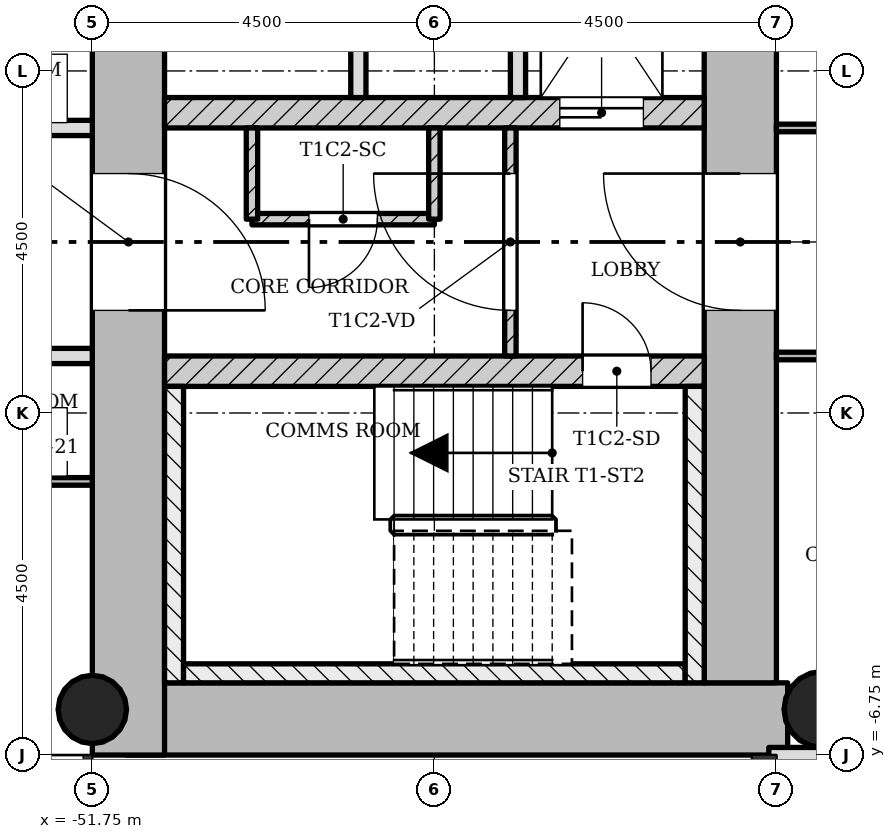
"""IFC4 building model, lengths in metres.
Left out: names, types, materials, properties, quantities, classifications, styles, units other than length and angle.
Written with IfcOpenShell. Run it as: python <this file> out.ifc"""

import sys

from ifc_helpers import new_model, si_unit, direction, frame, frame_2d, origin, origin_2d, place, context, subcontext, project, spatial, rectangle, hollow_circle, extrude, element, fill, save


model = new_model("IFC4")
c1 = context("Model", 3, precision=1e-05, world=origin(), true_north=direction((0.0, 1.0)))
c2 = subcontext(c1, "Body", "Model", "MODEL_VIEW")
j1 = project(units=[si_unit("LENGTHUNIT", "METRE"), si_unit("PLANEANGLEUNIT", "RADIAN")], contexts=[c1])
p1 = place(None, origin())
s1 = spatial("IfcSite", under=j1, at=p1, CompositionType="ELEMENT")
p2 = place(p1, origin())
s2 = spatial("IfcBuilding", under=s1, at=p2, CompositionType="ELEMENT")
p3 = place(p2, frame((0.0, 0.0, 83.4)))
s3 = spatial("IfcBuildingStorey", under=s2, at=p3, CompositionType="ELEMENT", Elevation=83.4)
p4 = place(p3, frame((-51.298, -6.275, 0.0), z_axis=(0.0, 0.0, 1.0), x_axis=(1.0, 0.0, 0.0)))
e1 = element("IfcWall", 1, at=p4, inside=s3, PredefinedType="SHEAR", context=c2, shape_type="SweptSolid", body=[
    extrude(rectangle(XDim=8.696, YDim=0.95, at=frame_2d((4.348, 0.0))), origin(), (0.0, 0.0, 1.0), 3.4),
])
p5 = place(p3, frame((-43.225, -5.8, 0.0), z_axis=(0.0, 0.0, 1.0), x_axis=(0.0, 1.0, 0.0)))
e2 = element("IfcWall", 2, at=p5, inside=s3, PredefinedType="SHEAR", context=c2, shape_type="SweptSolid", body=[
    extrude(rectangle(XDim=12.55, YDim=0.95, at=frame_2d((6.275, 0.0))), origin(), (0.0, 0.0, 1.0), 3.4),
])
p6 = place(p5, frame((4.9, 0.0, 0.0)))
e3 = element("IfcOpeningElement", 3, at=p6, cuts=e2, PredefinedType="OPENING", context=c2, shape_type="SweptSolid", body=[
    extrude(rectangle(XDim=1.8, YDim=2.1, at=frame_2d((0.9, 1.05))), frame((0.0, 0.485, 0.0), z_axis=(0.0, -1.0, 0.0), x_axis=(1.0, 0.0, 0.0)), (0.0, 0.0, 1.0), 0.97),
])
p7 = place(p3, frame((-51.275, 5.8, 0.0), z_axis=(0.0, 0.0, 1.0), x_axis=(0.0, -1.0, 0.0)))
e4 = element("IfcWall", 4, at=p7, inside=s3, PredefinedType="SHEAR", context=c2, shape_type="SweptSolid", body=[
    extrude(rectangle(XDim=12.55, YDim=0.95, at=frame_2d((6.275, 0.0))), origin(), (0.0, 0.0, 1.0), 3.4),
])
p8 = place(p7, frame((4.9, 0.0, 0.0)))
e5 = element("IfcOpeningElement", 5, at=p8, cuts=e4, PredefinedType="OPENING", context=c2, shape_type="SweptSolid", body=[
    extrude(rectangle(XDim=1.8, YDim=2.1, at=frame_2d((0.9, 1.05))), frame((0.0, 0.485, 0.0), z_axis=(0.0, -1.0, 0.0), x_axis=(1.0, 0.0, 0.0)), (0.0, 0.0, 1.0), 0.97),
])
p9 = place(p3, frame((-50.8, -1.7, 0.0), z_axis=(0.0, 0.0, 1.0), x_axis=(1.0, 0.0, 0.0)))
e6 = element("IfcWall", 6, at=p9, inside=s3, PredefinedType="SHEAR", context=c2, shape_type="SweptSolid", body=[
    extrude(rectangle(XDim=7.1, YDim=0.4, at=frame_2d((3.55, 0.0))), origin(), (0.0, 0.0, 1.0), 3.4),
])
p10 = place(p9, frame((5.5, 0.0, 0.0)))
e7 = element("IfcOpeningElement", 7, at=p10, cuts=e6, PredefinedType="OPENING", context=c2, shape_type="SweptSolid", body=[
    extrude(rectangle(XDim=0.9, YDim=2.1, at=frame_2d((0.45, 1.05))), frame((0.0, 0.21, 0.0), z_axis=(0.0, -1.0, 0.0), x_axis=(1.0, 0.0, 0.0)), (0.0, 0.0, 1.0), 0.42),
])
p11 = place(p3, frame((-50.8, 1.7, 0.0), z_axis=(0.0, 0.0, 1.0), x_axis=(1.0, 0.0, 0.0)))
e8 = element("IfcWall", 8, at=p11, inside=s3, PredefinedType="SHEAR", context=c2, shape_type="SweptSolid", body=[
    extrude(rectangle(XDim=7.1, YDim=0.4, at=frame_2d((3.55, 0.0))), origin(), (0.0, 0.0, 1.0), 3.4),
])
p12 = place(p11, frame((5.2, 0.0, 0.0)))
e9 = element("IfcOpeningElement", 9, at=p12, cuts=e8, PredefinedType="OPENING", context=c2, shape_type="SweptSolid", body=[
    extrude(rectangle(XDim=1.1, YDim=2.1, at=frame_2d((0.55, 1.05))), frame((0.0, 0.21, 0.0), z_axis=(0.0, -1.0, 0.0), x_axis=(1.0, 0.0, 0.0)), (0.0, 0.0, 1.0), 0.42),
])
p13 = place(p3, frame((-51.75, -6.15, 0.0), z_axis=(0.0, 0.0, 1.0), x_axis=(1.0, 0.0, 0.0)))
e10 = element("IfcColumn", 10, at=p13, inside=s3, PredefinedType="COLUMN", context=c2, shape_type="SweptSolid", body=[
    extrude(hollow_circle(Radius=0.45, WallThickness=0.032, at=origin_2d()), origin(), (0.0, 0.0, 1.0), 3.4),
])
p14 = place(p3, frame((-42.15, -6.15, 0.0), z_axis=(0.0, 0.0, 1.0), x_axis=(1.0, 0.0, 0.0)))
e11 = element("IfcColumn", 11, at=p14, inside=s3, PredefinedType="COLUMN", context=c2, shape_type="SweptSolid", body=[
    extrude(hollow_circle(Radius=0.5, WallThickness=0.036, at=origin_2d()), origin(), (0.0, 0.0, 1.0), 3.4),
])
p15 = place(p3, frame((-46.25, 1.5, 0.0), z_axis=(0.0, 0.0, 1.0), x_axis=(0.0, -1.0, 0.0)))
e12 = element("IfcWall", 12, at=p15, inside=s3, PredefinedType="PARTITIONING", context=c2, shape_type="SweptSolid", body=[
    extrude(rectangle(XDim=3.0, YDim=0.15, at=frame_2d((1.5, 0.0))), origin(), (0.0, 0.0, 1.0), 3.0),
])
p16 = place(p15, frame((0.6, 0.0, 0.0)))
e13 = element("IfcOpeningElement", 13, at=p16, cuts=e12, PredefinedType="OPENING", context=c2, shape_type="SweptSolid", body=[
    extrude(rectangle(XDim=1.8, YDim=2.1, at=frame_2d((0.9, 1.05))), frame((0.0, 0.085, 0.0), z_axis=(0.0, -1.0, 0.0), x_axis=(1.0, 0.0, 0.0)), (0.0, 0.0, 1.0), 0.17),
])
for number, where, z_axis, x_axis in (
    (14, (-46.15, 5.8, 0.0), (0.0, 0.0, 1.0), (0.0, -1.0, 0.0)),
    (15, (-48.25, 5.8, 0.0), (0.0, 0.0, 1.0), (0.0, -1.0, 0.0)),
):
    element("IfcWall", number, at=place(p3, frame(where, z_axis=z_axis, x_axis=x_axis)), inside=s3, PredefinedType="SOLIDWALL", context=c2, shape_type="SweptSolid", body=[
        extrude(rectangle(XDim=3.9, YDim=0.2, at=frame_2d((1.95, 0.0))), origin(), (0.0, 0.0, 1.0), 3.0),
    ])
p17 = place(p3, frame((-47.25, 0.3, 0.0), z_axis=(0.0, 0.0, 1.0), x_axis=(-1.0, 0.0, 0.0)))
e16 = element("IfcWall", 16, at=p17, inside=s3, PredefinedType="PARTITIONING", context=c2, shape_type="SweptSolid", body=[
    extrude(rectangle(XDim=2.4, YDim=0.15, at=frame_2d((1.2, 0.0))), origin(), (0.0, 0.0, 1.0), 3.0),
])
p18 = place(p17, frame((0.75, 0.0, 0.0)))
e17 = element("IfcOpeningElement", 17, at=p18, cuts=e16, PredefinedType="OPENING", context=c2, shape_type="SweptSolid", body=[
    extrude(rectangle(XDim=0.9, YDim=2.1, at=frame_2d((0.45, 1.05))), frame((0.0, 0.085, 0.0), z_axis=(0.0, -1.0, 0.0), x_axis=(1.0, 0.0, 0.0)), (0.0, 0.0, 1.0), 0.17),
])
for number, where, z_axis, x_axis in (
    (18, (-47.25, 0.3, 0.0), (0.0, 0.0, 1.0), (0.0, 1.0, 0.0)),
    (19, (-49.65, 0.3, 0.0), (0.0, 0.0, 1.0), (0.0, 1.0, 0.0)),
):
    element("IfcWall", number, at=place(p3, frame(where, z_axis=z_axis, x_axis=x_axis)), inside=s3, PredefinedType="PARTITIONING", context=c2, shape_type="SweptSolid", body=[
        extrude(rectangle(XDim=1.2, YDim=0.15, at=frame_2d((0.6, 0.0))), origin(), (0.0, 0.0, 1.0), 3.0),
    ])
p19 = place(p3, frame((-42.85, -6.75, 0.0), z_axis=(0.0, 0.0, 1.0), x_axis=(1.0, 0.0, 0.0)))
e20 = element("IfcWall", 20, at=p19, inside=s3, PredefinedType="SOLIDWALL", context=c2, shape_type="SweptSolid", body=[
    extrude(rectangle(XDim=5.95, YDim=0.2, at=frame_2d((2.975, 0.0))), origin(), (0.0, 0.0, 1.0), 3.0),
])
p20 = place(p3, frame((-56.25, -3.15, 0.0), z_axis=(0.0, 0.0, 1.0), x_axis=(1.0, 0.0, 0.0)))
e21 = element("IfcWall", 21, at=p20, inside=s3, PredefinedType="PARTITIONING", context=c2, shape_type="SweptSolid", body=[
    extrude(rectangle(XDim=4.5, YDim=0.1, at=frame_2d((2.25, 0.0))), origin(), (0.0, 0.0, 1.0), 3.0),
])
p21 = place(p20, frame((0.6, 0.0, 0.0)))
e22 = element("IfcOpeningElement", 22, at=p21, cuts=e21, PredefinedType="OPENING", context=c2, shape_type="SweptSolid", body=[
    extrude(rectangle(XDim=0.9, YDim=2.1, at=frame_2d((0.45, 1.05))), frame((0.0, 0.06, 0.0), z_axis=(0.0, -1.0, 0.0), x_axis=(1.0, 0.0, 0.0)), (0.0, 0.0, 1.0), 0.12),
])
p22 = place(p3, frame((-42.75, -1.5, 0.0), z_axis=(0.0, 0.0, 1.0), x_axis=(1.0, 0.0, 0.0)))
e23 = element("IfcWall", 23, at=p22, inside=s3, PredefinedType="PARTITIONING", context=c2, shape_type="SweptSolid", body=[
    extrude(rectangle(XDim=5.85, YDim=0.1, at=frame_2d((2.925, 0.0))), origin(), (0.0, 0.0, 1.0), 3.0),
])
p23 = place(p22, frame((0.975, 0.0, 0.0)))
e24 = element("IfcOpeningElement", 24, at=p23, cuts=e23, PredefinedType="OPENING", context=c2, shape_type="SweptSolid", body=[
    extrude(rectangle(XDim=0.9, YDim=2.1, at=frame_2d((0.45, 1.05))), frame((0.0, 0.06, 0.0), z_axis=(0.0, -1.0, 0.0), x_axis=(1.0, 0.0, 0.0)), (0.0, 0.0, 1.0), 0.12),
])
p24 = place(p3, frame((-56.25, -1.5, 0.0), z_axis=(0.0, 0.0, 1.0), x_axis=(1.0, 0.0, 0.0)))
e25 = element("IfcWall", 25, at=p24, inside=s3, PredefinedType="SOLIDWALL", context=c2, shape_type="SweptSolid", body=[
    extrude(rectangle(XDim=4.5, YDim=0.2, at=frame_2d((2.25, 0.0))), origin(), (0.0, 0.0, 1.0), 3.0),
])
p25 = place(p24, frame((0.6, 0.0, 0.0)))
e26 = element("IfcOpeningElement", 26, at=p25, cuts=e25, PredefinedType="OPENING", context=c2, shape_type="SweptSolid", body=[
    extrude(rectangle(XDim=0.9, YDim=2.1, at=frame_2d((0.45, 1.05))), frame((0.0, 0.11, 0.0), z_axis=(0.0, -1.0, 0.0), x_axis=(1.0, 0.0, 0.0)), (0.0, 0.0, 1.0), 0.22),
])
p26 = place(p3, frame((-42.75, 1.5, 0.0), z_axis=(0.0, 0.0, 1.0), x_axis=(1.0, 0.0, 0.0)))
e27 = element("IfcWall", 27, at=p26, inside=s3, PredefinedType="PARTITIONING", context=c2, shape_type="SweptSolid", body=[
    extrude(rectangle(XDim=5.85, YDim=0.1, at=frame_2d((2.925, 0.0))), origin(), (0.0, 0.0, 1.0), 3.0),
])
p27 = place(p26, frame((1.575, 0.0, 0.0)))
e28 = element("IfcOpeningElement", 28, at=p27, cuts=e27, PredefinedType="OPENING", context=c2, shape_type="SweptSolid", body=[
    extrude(rectangle(XDim=0.9, YDim=2.1, at=frame_2d((0.45, 1.05))), frame((0.0, 0.06, 0.0), z_axis=(0.0, -1.0, 0.0), x_axis=(1.0, 0.0, 0.0)), (0.0, 0.0, 1.0), 0.12),
])
p28 = place(p3, frame((-56.25, 1.5, 0.0), z_axis=(0.0, 0.0, 1.0), x_axis=(1.0, 0.0, 0.0)))
e29 = element("IfcWall", 29, at=p28, inside=s3, PredefinedType="SOLIDWALL", context=c2, shape_type="SweptSolid", body=[
    extrude(rectangle(XDim=4.5, YDim=0.2, at=frame_2d((2.25, 0.0))), origin(), (0.0, 0.0, 1.0), 3.0),
])
p29 = place(p28, frame((0.6, 0.0, 0.0)))
e30 = element("IfcOpeningElement", 30, at=p29, cuts=e29, PredefinedType="OPENING", context=c2, shape_type="SweptSolid", body=[
    extrude(rectangle(XDim=0.9, YDim=2.1, at=frame_2d((0.45, 1.05))), frame((0.0, 0.11, 0.0), z_axis=(0.0, -1.0, 0.0), x_axis=(1.0, 0.0, 0.0)), (0.0, 0.0, 1.0), 0.22),
])
p30 = place(p3, frame((-50.675, -1.9, 0.0), z_axis=(0.0, 0.0, 1.0), x_axis=(0.0, -1.0, 0.0)))
e31 = element("IfcWall", 31, at=p30, inside=s3, PredefinedType="SHEAR", context=c2, shape_type="SweptSolid", body=[
    extrude(rectangle(XDim=3.9, YDim=0.25, at=frame_2d((1.95, 0.0))), origin(), (0.0, 0.0, 1.0), 3.4),
])
p31 = place(p3, frame((-43.95, -5.675, 0.0), z_axis=(0.0, 0.0, 1.0), x_axis=(-1.0, 0.0, 0.0)))
e32 = element("IfcWall", 32, at=p31, inside=s3, PredefinedType="SHEAR", context=c2, shape_type="SweptSolid", body=[
    extrude(rectangle(XDim=6.6, YDim=0.25, at=frame_2d((3.3, 0.0))), origin(), (0.0, 0.0, 1.0), 3.4),
])
p32 = place(p3, frame((-43.825, -1.9, 0.0), z_axis=(0.0, 0.0, 1.0), x_axis=(0.0, -1.0, 0.0)))
e33 = element("IfcWall", 33, at=p32, inside=s3, PredefinedType="SHEAR", context=c2, shape_type="SweptSolid", body=[
    extrude(rectangle(XDim=3.9, YDim=0.25, at=frame_2d((1.95, 0.0))), origin(), (0.0, 0.0, 1.0), 3.4),
])
p33 = place(p16, origin())
e34 = element("IfcDoor", 34, at=p33, inside=s3, OperationType="SINGLE_SWING_LEFT", PredefinedType="DOOR", context=c2, shape_type="SweptSolid", body=[
    extrude(rectangle(XDim=1.8, YDim=2.1, at=frame_2d((0.9, 1.05))), frame((0.0, 0.025, 0.0), z_axis=(0.0, -1.0, 0.0), x_axis=(1.0, 0.0, 0.0)), (0.0, 0.0, 1.0), 0.05),
])
fill(e13, e34)
p34 = place(p18, origin())
e35 = element("IfcDoor", 35, at=p34, inside=s3, OperationType="SINGLE_SWING_LEFT", PredefinedType="DOOR", context=c2, shape_type="SweptSolid", body=[
    extrude(rectangle(XDim=0.9, YDim=2.1, at=frame_2d((0.45, 1.05))), frame((0.0, 0.025, 0.0), z_axis=(0.0, -1.0, 0.0), x_axis=(1.0, 0.0, 0.0)), (0.0, 0.0, 1.0), 0.05),
])
fill(e17, e35)
p35 = place(p10, origin())
e36 = element("IfcDoor", 36, at=p35, inside=s3, OperationType="SINGLE_SWING_RIGHT", PredefinedType="DOOR", context=c2, shape_type="SweptSolid", body=[
    extrude(rectangle(XDim=0.9, YDim=2.1, at=frame_2d((0.45, 1.05))), frame((0.0, 0.025, 0.0), z_axis=(0.0, -1.0, 0.0), x_axis=(1.0, 0.0, 0.0)), (0.0, 0.0, 1.0), 0.05),
])
fill(e7, e36)
p36 = place(p12, origin())
e37 = element("IfcDoor", 37, at=p36, inside=s3, OperationType="SLIDING_TO_LEFT", PredefinedType="DOOR", context=c2, shape_type="SweptSolid", body=[
    extrude(rectangle(XDim=1.1, YDim=2.1, at=frame_2d((0.55, 1.05))), frame((0.0, 0.025, 0.0), z_axis=(0.0, -1.0, 0.0), x_axis=(1.0, 0.0, 0.0)), (0.0, 0.0, 1.0), 0.05),
])
fill(e9, e37)
p37 = place(p6, origin())
e38 = element("IfcDoor", 38, at=p37, inside=s3, OperationType="SINGLE_SWING_LEFT", PredefinedType="DOOR", context=c2, shape_type="SweptSolid", body=[
    extrude(rectangle(XDim=1.8, YDim=2.1, at=frame_2d((0.9, 1.05))), frame((0.0, 0.025, 0.0), z_axis=(0.0, -1.0, 0.0), x_axis=(1.0, 0.0, 0.0)), (0.0, 0.0, 1.0), 0.05),
])
fill(e3, e38)
p38 = place(p8, origin())
e39 = element("IfcDoor", 39, at=p38, inside=s3, OperationType="SINGLE_SWING_LEFT", PredefinedType="DOOR", context=c2, shape_type="SweptSolid", body=[
    extrude(rectangle(XDim=1.8, YDim=2.1, at=frame_2d((0.9, 1.05))), frame((0.0, 0.025, 0.0), z_axis=(0.0, -1.0, 0.0), x_axis=(1.0, 0.0, 0.0)), (0.0, 0.0, 1.0), 0.05),
])
fill(e5, e39)
save(model, sys.argv[1])
